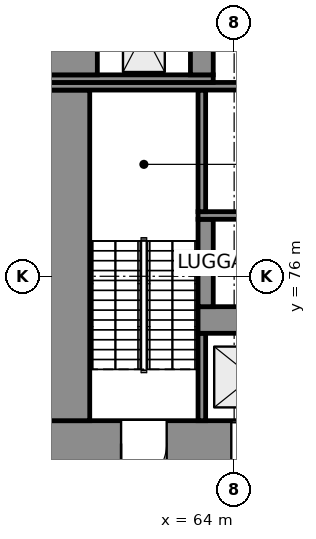
"""IFC4 building model, lengths in metres.
Left out: names, types, materials, properties, quantities, classifications, styles, units other than length and angle.
Written with IfcOpenShell. Run it as: python <this file> out.ifc"""

import sys

from ifc_helpers import new_model, si_unit, direction, frame, frame_2d, origin, place, context, subcontext, project, spatial, rectangle, extrude, element, fill, save


model = new_model("IFC4")
c1 = context("Model", 3, precision=1e-05, world=origin(), true_north=direction((0.0, 1.0)))
c2 = subcontext(c1, "Body", "Model", "MODEL_VIEW")
j1 = project(units=[si_unit("LENGTHUNIT", "METRE"), si_unit("PLANEANGLEUNIT", "RADIAN")], contexts=[c1])
p1 = place(None, origin())
s1 = spatial("IfcSite", under=j1, at=p1, CompositionType="ELEMENT")
p2 = place(p1, origin())
s2 = spatial("IfcBuilding", under=s1, at=p2, CompositionType="ELEMENT")
p3 = place(p2, frame((0.0, 0.0, 34.0)))
s3 = spatial("IfcBuildingStorey", under=s2, at=p3, CompositionType="ELEMENT", Elevation=34.0)
p4 = place(p3, frame((59.0, 71.6, 0.0), z_axis=(0.0, 0.0, 1.0), x_axis=(1.0, 0.0, 0.0)))
e1 = element("IfcWall", 1, at=p4, inside=s3, PredefinedType="SHEAR", context=c2, shape_type="SweptSolid", body=[
    extrude(rectangle(XDim=22.0, YDim=1.2, at=frame_2d((11.0, 0.0))), origin(), (0.0, 0.0, 1.0), 5.0),
])
p5 = place(p4, frame((2.025, 0.0, 0.0)))
e2 = element("IfcOpeningElement", 2, at=p5, cuts=e1, PredefinedType="OPENING", context=c2, shape_type="SweptSolid", body=[
    extrude(rectangle(XDim=1.2, YDim=2.1, at=frame_2d((0.6, 1.05))), frame((0.0, 0.61, 0.0), z_axis=(0.0, -1.0, 0.0), x_axis=(1.0, 0.0, 0.0)), (0.0, 0.0, 1.0), 1.22),
])
p6 = place(p4, frame((18.775, 0.0, 0.0)))
e3 = element("IfcOpeningElement", 3, at=p6, cuts=e1, PredefinedType="OPENING", context=c2, shape_type="SweptSolid", body=[
    extrude(rectangle(XDim=1.2, YDim=2.1, at=frame_2d((0.6, 1.05))), frame((0.0, 0.61, 0.0), z_axis=(0.0, -1.0, 0.0), x_axis=(1.0, 0.0, 0.0)), (0.0, 0.0, 1.0), 1.22),
])
p7 = place(p4, frame((10.0, 0.0, 0.0)))
e4 = element("IfcOpeningElement", 4, at=p7, cuts=e1, PredefinedType="OPENING", context=c2, shape_type="SweptSolid", body=[
    extrude(rectangle(XDim=2.0, YDim=2.1, at=frame_2d((1.0, 1.05))), frame((0.0, 0.61, 0.0), z_axis=(0.0, -1.0, 0.0), x_axis=(1.0, 0.0, 0.0)), (0.0, 0.0, 1.0), 1.22),
])
p8 = place(p4, frame((4.925, 0.0, 0.0)))
e5 = element("IfcOpeningElement", 5, at=p8, cuts=e1, PredefinedType="OPENING", context=c2, shape_type="SweptSolid", body=[
    extrude(rectangle(XDim=1.1, YDim=2.1, at=frame_2d((0.55, 1.05))), frame((0.0, 0.61, 0.0), z_axis=(0.0, -1.0, 0.0), x_axis=(1.0, 0.0, 0.0)), (0.0, 0.0, 1.0), 1.22),
])
p9 = place(p4, frame((7.575, 0.0, 0.0)))
e6 = element("IfcOpeningElement", 6, at=p9, cuts=e1, PredefinedType="OPENING", context=c2, shape_type="SweptSolid", body=[
    extrude(rectangle(XDim=1.1, YDim=2.1, at=frame_2d((0.55, 1.05))), frame((0.0, 0.61, 0.0), z_axis=(0.0, -1.0, 0.0), x_axis=(1.0, 0.0, 0.0)), (0.0, 0.0, 1.0), 1.22),
])
p10 = place(p4, frame((13.125, 0.0, 0.0)))
e7 = element("IfcOpeningElement", 7, at=p10, cuts=e1, PredefinedType="OPENING", context=c2, shape_type="SweptSolid", body=[
    extrude(rectangle(XDim=1.1, YDim=2.1, at=frame_2d((0.55, 1.05))), frame((0.0, 0.61, 0.0), z_axis=(0.0, -1.0, 0.0), x_axis=(1.0, 0.0, 0.0)), (0.0, 0.0, 1.0), 1.22),
])
p11 = place(p4, frame((15.775, 0.0, 0.0)))
e8 = element("IfcOpeningElement", 8, at=p11, cuts=e1, PredefinedType="OPENING", context=c2, shape_type="SweptSolid", body=[
    extrude(rectangle(XDim=1.1, YDim=2.1, at=frame_2d((0.55, 1.05))), frame((0.0, 0.61, 0.0), z_axis=(0.0, -1.0, 0.0), x_axis=(1.0, 0.0, 0.0)), (0.0, 0.0, 1.0), 1.22),
])
p12 = place(p3, frame((59.6, 72.2, 0.0), z_axis=(0.0, 0.0, 1.0), x_axis=(0.0, 1.0, 0.0)))
e9 = element("IfcWall", 9, at=p12, inside=s3, PredefinedType="SHEAR", context=c2, shape_type="SweptSolid", body=[
    extrude(rectangle(XDim=8.7, YDim=1.2, at=frame_2d((4.35, 0.0))), origin(), (0.0, 0.0, 1.0), 5.0),
])
p13 = place(p3, frame((63.15, 72.2, 0.0), z_axis=(0.0, 0.0, 1.0), x_axis=(0.0, 1.0, 0.0)))
e10 = element("IfcWall", 10, at=p13, inside=s3, PredefinedType="SHEAR", context=c2, shape_type="SweptSolid", body=[
    extrude(rectangle(XDim=2.3, YDim=0.2, at=frame_2d((1.15, 0.0))), origin(), (0.0, 0.0, 1.0), 5.0),
])
p14 = place(p3, frame((63.05, 74.85, 0.0), z_axis=(0.0, 0.0, 1.0), x_axis=(1.0, 0.0, 0.0)))
e11 = element("IfcWall", 11, at=p14, inside=s3, PredefinedType="SHEAR", context=c2, shape_type="SweptSolid", body=[
    extrude(rectangle(XDim=5.7, YDim=0.7, at=frame_2d((2.85, 0.0))), origin(), (0.0, 0.0, 1.0), 5.0),
])
p15 = place(p3, frame((63.25, 75.2, 0.0), z_axis=(0.0, 0.0, 1.0), x_axis=(0.0, 1.0, 0.0)))
e12 = element("IfcWall", 12, at=p15, inside=s3, PredefinedType="SHEAR", context=c2, shape_type="SweptSolid", body=[
    extrude(rectangle(XDim=2.3, YDim=0.4, at=frame_2d((1.15, 0.0))), origin(), (0.0, 0.0, 1.0), 5.0),
])
p16 = place(p3, frame((63.05, 77.6, 0.0), z_axis=(0.0, 0.0, 1.0), x_axis=(1.0, 0.0, 0.0)))
e13 = element("IfcWall", 13, at=p16, inside=s3, PredefinedType="SHEAR", context=c2, shape_type="SweptSolid", body=[
    extrude(rectangle(XDim=5.7, YDim=0.2, at=frame_2d((2.85, 0.0))), origin(), (0.0, 0.0, 1.0), 5.0),
])
p17 = place(p16, frame((1.175, 0.0, 0.0)))
e14 = element("IfcOpeningElement", 14, at=p17, cuts=e13, PredefinedType="OPENING", context=c2, shape_type="SweptSolid", body=[
    extrude(rectangle(XDim=0.9, YDim=2.1, at=frame_2d((0.45, 1.05))), frame((0.0, 0.11, 0.0), z_axis=(0.0, -1.0, 0.0), x_axis=(1.0, 0.0, 0.0)), (0.0, 0.0, 1.0), 0.22),
])
p18 = place(p16, frame((3.825, 0.0, 0.0)))
e15 = element("IfcOpeningElement", 15, at=p18, cuts=e13, PredefinedType="OPENING", context=c2, shape_type="SweptSolid", body=[
    extrude(rectangle(XDim=0.9, YDim=2.1, at=frame_2d((0.45, 1.05))), frame((0.0, 0.11, 0.0), z_axis=(0.0, -1.0, 0.0), x_axis=(1.0, 0.0, 0.0)), (0.0, 0.0, 1.0), 0.22),
])
p19 = place(p3, frame((63.15, 77.7, 0.0), z_axis=(0.0, 0.0, 1.0), x_axis=(0.0, 1.0, 0.0)))
e16 = element("IfcWall", 16, at=p19, inside=s3, PredefinedType="SHEAR", context=c2, shape_type="SweptSolid", body=[
    extrude(rectangle(XDim=3.2, YDim=0.2, at=frame_2d((1.6, 0.0))), origin(), (0.0, 0.0, 1.0), 5.0),
])
p20 = place(p3, frame((59.0, 81.0, 0.0), z_axis=(0.0, 0.0, 1.0), x_axis=(1.0, 0.0, 0.0)))
e17 = element("IfcWall", 17, at=p20, inside=s3, PredefinedType="SHEAR", context=c2, shape_type="SweptSolid", body=[
    extrude(rectangle(XDim=22.0, YDim=0.2, at=frame_2d((11.0, 0.0))), origin(), (0.0, 0.0, 1.0), 5.0),
])
p21 = place(p20, frame((15.725, 0.0, 0.0)))
e18 = element("IfcOpeningElement", 18, at=p21, cuts=e17, PredefinedType="OPENING", context=c2, shape_type="SweptSolid", body=[
    extrude(rectangle(XDim=1.1, YDim=2.1, at=frame_2d((0.55, 1.05))), frame((0.0, 0.11, 0.0), z_axis=(0.0, -1.0, 0.0), x_axis=(1.0, 0.0, 0.0)), (0.0, 0.0, 1.0), 0.22),
])
p22 = place(p3, frame((59.0, 81.2, 0.0), z_axis=(0.0, 0.0, 1.0), x_axis=(1.0, 0.0, 0.0)))
e19 = element("IfcWall", 19, at=p22, inside=s3, PredefinedType="SHEAR", context=c2, shape_type="SweptSolid", body=[
    extrude(rectangle(XDim=4.45, YDim=0.2, at=frame_2d((2.225, 0.0))), origin(), (0.0, 0.0, 1.0), 5.0),
])
p23 = place(p3, frame((59.7, 81.3, 0.0), z_axis=(0.0, 0.0, 1.0), x_axis=(0.0, 1.0, 0.0)))
e20 = element("IfcWall", 20, at=p23, inside=s3, PredefinedType="SHEAR", context=c2, shape_type="SweptSolid", body=[
    extrude(rectangle(XDim=2.25, YDim=1.4, at=frame_2d((1.125, 0.0))), origin(), (0.0, 0.0, 1.0), 5.0),
])
p24 = place(p3, frame((63.15, 81.3, 0.0), z_axis=(0.0, 0.0, 1.0), x_axis=(0.0, 1.0, 0.0)))
e21 = element("IfcWall", 21, at=p24, inside=s3, PredefinedType="SHEAR", context=c2, shape_type="SweptSolid", body=[
    extrude(rectangle(XDim=2.25, YDim=0.6, at=frame_2d((1.125, 0.0))), origin(), (0.0, 0.0, 1.0), 5.0),
])
p25 = place(p5, frame((1.2, 0.0, 0.0), z_axis=(0.0, 0.0, 1.0), x_axis=(-1.0, 0.0, 0.0)))
e22 = element("IfcDoor", 22, at=p25, inside=s3, OperationType="SINGLE_SWING_RIGHT", PredefinedType="DOOR", context=c2, shape_type="SweptSolid", body=[
    extrude(rectangle(XDim=1.2, YDim=2.1, at=frame_2d((0.6, 1.05))), frame((0.0, 0.025, 0.0), z_axis=(0.0, -1.0, 0.0), x_axis=(1.0, 0.0, 0.0)), (0.0, 0.0, 1.0), 0.05),
])
fill(e2, e22)
p26 = place(p8, origin())
e23 = element("IfcDoor", 23, at=p26, inside=s3, OperationType="DOUBLE_DOOR_SLIDING", PredefinedType="DOOR", context=c2, shape_type="SweptSolid", body=[
    extrude(rectangle(XDim=1.1, YDim=2.1, at=frame_2d((0.55, 1.05))), frame((0.0, 0.025, 0.0), z_axis=(0.0, -1.0, 0.0), x_axis=(1.0, 0.0, 0.0)), (0.0, 0.0, 1.0), 0.05),
])
fill(e5, e23)
save(model, sys.argv[1])
